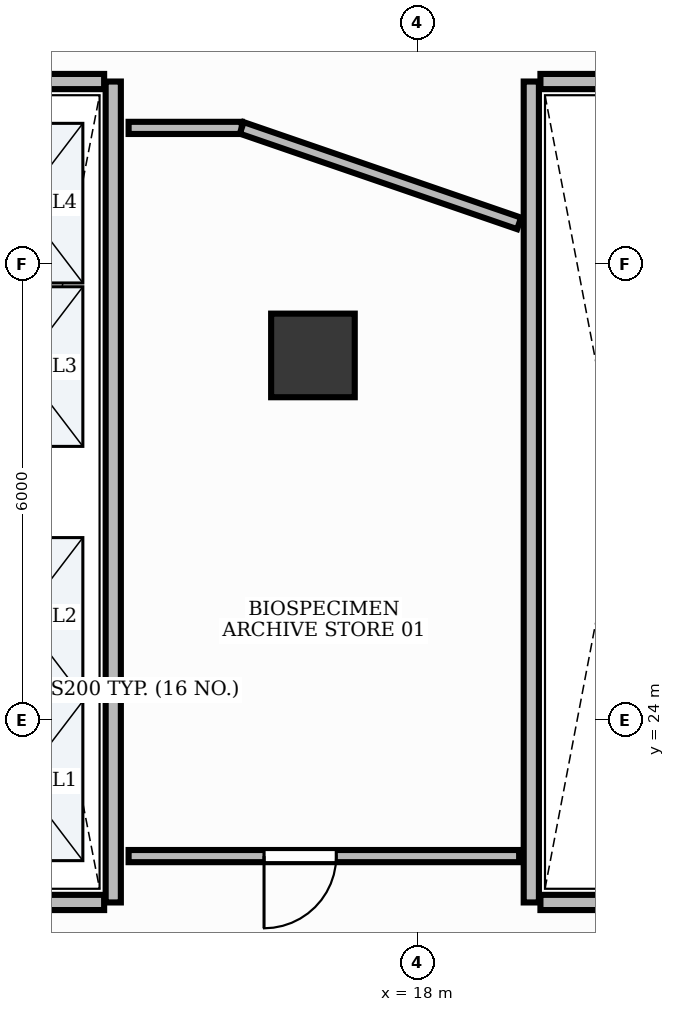
"""IFC4 building model, lengths in metres.
Left out: names, types, materials, properties, quantities, classifications, styles, units other than length and angle.
Written with IfcOpenShell. Run it as: python <this file> out.ifc"""

import sys

from ifc_helpers import new_model, si_unit, direction, frame, frame_2d, origin, origin_2d, place, context, subcontext, project, spatial, rectangle, extrude, element, fill, save


model = new_model("IFC4")
c1 = context("Model", 3, precision=1e-05, world=origin(), true_north=direction((0.0, 1.0)))
c2 = subcontext(c1, "Body", "Model", "MODEL_VIEW")
j1 = project(units=[si_unit("LENGTHUNIT", "METRE"), si_unit("PLANEANGLEUNIT", "RADIAN")], contexts=[c1])
p1 = place(None, origin())
s1 = spatial("IfcSite", under=j1, at=p1, CompositionType="ELEMENT")
p2 = place(p1, origin())
s2 = spatial("IfcBuilding", under=s1, at=p2, CompositionType="ELEMENT")
p3 = place(p2, frame((0.0, 0.0, 127.8)))
s3 = spatial("IfcBuildingStorey", under=s2, at=p3, CompositionType="ELEMENT", Elevation=127.8)
p4 = place(p3, frame((16.627, 28.797, -0.0), z_axis=(0.0, 0.0, 1.0), x_axis=(1.0, 0.0, 0.0)))
e1 = element("IfcColumn", 1, at=p4, inside=s3, PredefinedType="COLUMN", context=c2, shape_type="SweptSolid", body=[
    extrude(rectangle(XDim=1.1, YDim=1.1, at=origin_2d()), origin(), (0.0, 0.0, 1.0), 3.901),
])
p5 = place(p3, frame((14.0, 21.6, 0.0), z_axis=(0.0, 0.0, 1.0), x_axis=(0.0, 1.0, 0.0)))
e2 = element("IfcWall", 2, at=p5, inside=s3, PredefinedType="PARTITIONING", context=c2, shape_type="SweptSolid", body=[
    extrude(rectangle(XDim=10.8, YDim=0.2, at=frame_2d((5.4, 0.0))), origin(), (0.0, 0.0, 1.0), 2.91),
])
for number, where, z_axis, x_axis in (
    (3, (11.72, 21.6, 0.0), (0.0, 0.0, 1.0), (1.0, 0.0, 0.0)),
    (4, (11.72, 32.4, 0.0), (0.0, 0.0, 1.0), (1.0, 0.0, 0.0)),
):
    element("IfcWall", number, at=place(p3, frame(where, z_axis=z_axis, x_axis=x_axis)), inside=s3, PredefinedType="PARTITIONING", context=c2, shape_type="SweptSolid", body=[
        extrude(rectangle(XDim=2.16, YDim=0.2, at=frame_2d((1.08, 0.0))), origin(), (0.0, 0.0, 1.0), 2.91),
    ])
p6 = place(p3, frame((19.5, 21.6, 0.0), z_axis=(0.0, 0.0, 1.0), x_axis=(0.0, 1.0, 0.0)))
e5 = element("IfcWall", 5, at=p6, inside=s3, PredefinedType="PARTITIONING", context=c2, shape_type="SweptSolid", body=[
    extrude(rectangle(XDim=10.8, YDim=0.2, at=frame_2d((5.4, 0.0))), origin(), (0.0, 0.0, 1.0), 2.91),
])
for number, where, z_axis, x_axis in (
    (6, (19.62, 21.6, 0.0), (0.0, 0.0, 1.0), (1.0, 0.0, 0.0)),
    (7, (19.62, 32.4, 0.0), (0.0, 0.0, 1.0), (1.0, 0.0, 0.0)),
):
    element("IfcWall", number, at=place(p3, frame(where, z_axis=z_axis, x_axis=x_axis)), inside=s3, PredefinedType="PARTITIONING", context=c2, shape_type="SweptSolid", body=[
        extrude(rectangle(XDim=2.11, YDim=0.2, at=frame_2d((1.055, 0.0))), origin(), (0.0, 0.0, 1.0), 2.91),
    ])
p7 = place(p3, frame((19.34, 22.21, 0.0), z_axis=(0.0, 0.0, 1.0), x_axis=(-1.0, 0.0, 0.0)))
e8 = element("IfcWall", 8, at=p7, inside=s3, PredefinedType="PARTITIONING", context=c2, shape_type="SweptSolid", body=[
    extrude(rectangle(XDim=5.138, YDim=0.16, at=frame_2d((2.569, 0.0))), origin(), (0.0, 0.0, 1.0), 2.91),
])
p8 = place(p7, frame((2.406, 0.0, 0.0)))
e9 = element("IfcOpeningElement", 9, at=p8, cuts=e8, PredefinedType="OPENING", context=c2, shape_type="SweptSolid", body=[
    extrude(rectangle(XDim=0.95, YDim=2.15, at=frame_2d((0.475, 1.075))), frame((0.0, 0.095, 0.0), z_axis=(0.0, -1.0, 0.0), x_axis=(1.0, 0.0, 0.0)), (0.0, 0.0, 1.0), 0.19),
])
p9 = place(p3, frame((14.202, 31.79, 0.0), z_axis=(0.0, 0.0, 1.0), x_axis=(1.0, 0.0, 0.0)))
e10 = element("IfcWall", 10, at=p9, inside=s3, PredefinedType="PARTITIONING", context=c2, shape_type="SweptSolid", body=[
    extrude(rectangle(XDim=1.489, YDim=0.16, at=frame_2d((0.744, 0.0))), origin(), (0.0, 0.0, 1.0), 2.91),
])
p10 = place(p3, frame((15.69, 31.79, 0.0), z_axis=(0.0, 0.0, 1.0), x_axis=(0.945518754025, -0.32556763627, 0.0)))
e11 = element("IfcWall", 11, at=p10, inside=s3, PredefinedType="PARTITIONING", context=c2, shape_type="SweptSolid", body=[
    extrude(rectangle(XDim=3.86, YDim=0.16, at=frame_2d((1.93, 0.0))), origin(), (0.0, 0.0, 1.0), 2.91),
])
p11 = place(p8, origin())
e12 = element("IfcDoor", 12, at=p11, inside=s3, OperationType="SINGLE_SWING_RIGHT", PredefinedType="DOOR", context=c2, shape_type="SweptSolid", body=[
    extrude(rectangle(XDim=0.95, YDim=2.15, at=frame_2d((0.475, 1.075))), frame((0.0, 0.025, 0.0), z_axis=(0.0, -1.0, 0.0), x_axis=(1.0, 0.0, 0.0)), (0.0, 0.0, 1.0), 0.05),
])
fill(e9, e12)
save(model, sys.argv[1])
